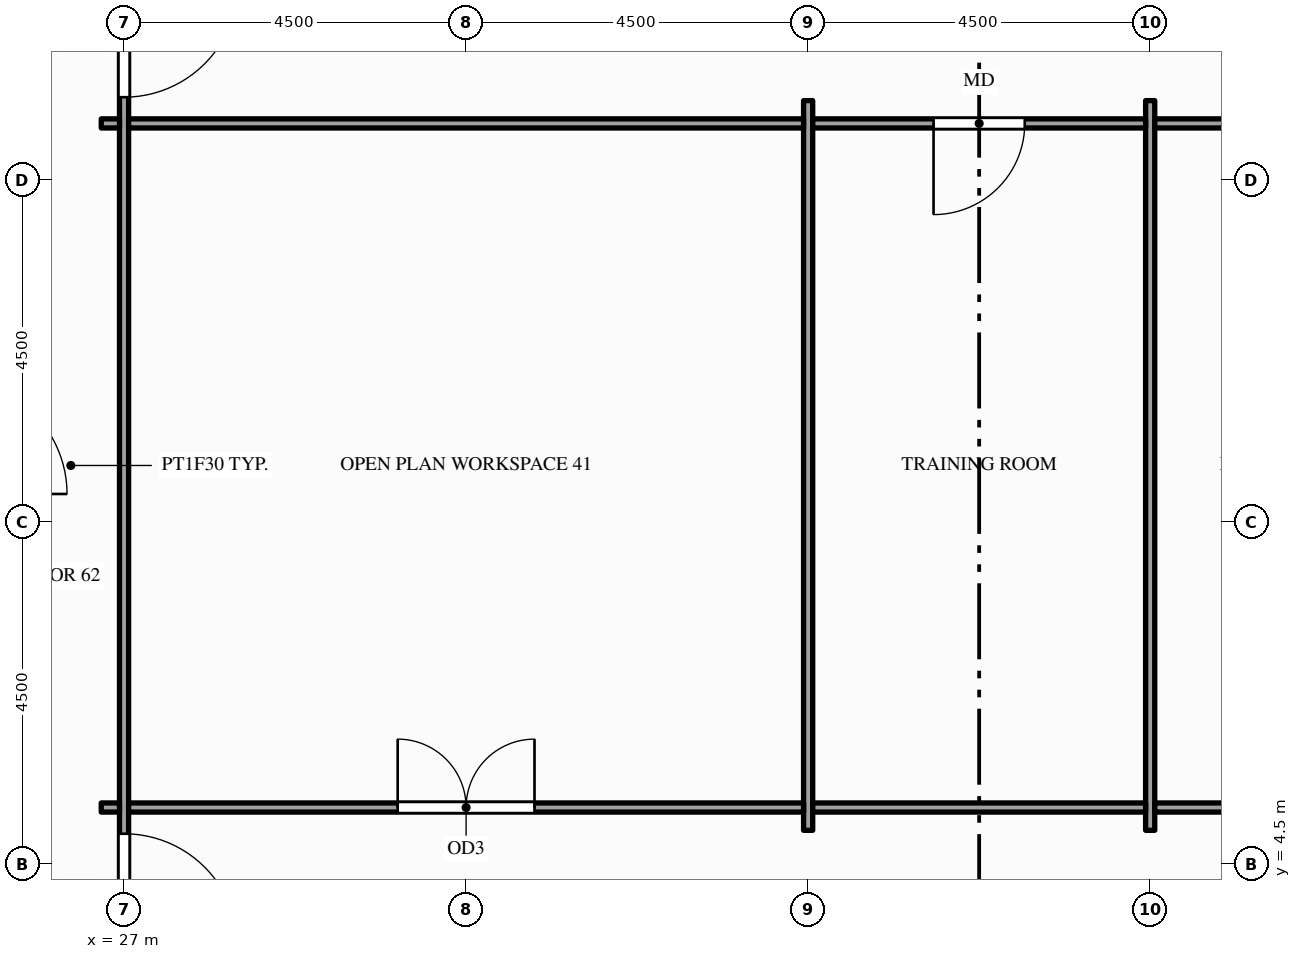
"""IFC4 building model, lengths in metres.
Left out: names, types, materials, properties, quantities, classifications, styles, units other than length and angle.
Written with IfcOpenShell. Run it as: python <this file> out.ifc"""

import sys

from ifc_helpers import new_model, si_unit, direction, frame, frame_2d, origin, place, context, subcontext, project, spatial, rectangle, extrude, element, fill, save


model = new_model("IFC4")
c1 = context("Model", 3, precision=1e-05, world=origin(), true_north=direction((0.0, 1.0)))
c2 = subcontext(c1, "Body", "Model", "MODEL_VIEW")
j1 = project(units=[si_unit("LENGTHUNIT", "METRE"), si_unit("PLANEANGLEUNIT", "RADIAN")], contexts=[c1])
p1 = place(None, origin())
s1 = spatial("IfcSite", under=j1, at=p1, CompositionType="ELEMENT")
p2 = place(p1, origin())
s2 = spatial("IfcBuilding", under=s1, at=p2, CompositionType="ELEMENT")
p3 = place(p2, frame((0.0, 0.0, 195.0)))
s3 = spatial("IfcBuildingStorey", under=s2, at=p3, CompositionType="ELEMENT", Elevation=195.0)
p4 = place(p3, frame((27.0, 2.7, 0.0), z_axis=(0.0, 0.0, 1.0), x_axis=(0.0, 1.0, 0.0)))
e1 = element("IfcWall", 1, at=p4, inside=s3, PredefinedType="PARTITIONING", context=c2, shape_type="SweptSolid", body=[
    extrude(rectangle(XDim=14.1, YDim=0.12, at=frame_2d((7.05, 0.0))), origin(), (0.0, 0.0, 1.0), 2.87),
])
p5 = place(p4, frame((0.705, 0.0, 0.0)))
e2 = element("IfcOpeningElement", 2, at=p5, cuts=e1, PredefinedType="OPENING", context=c2, shape_type="SweptSolid", body=[
    extrude(rectangle(XDim=1.5, YDim=2.1, at=frame_2d((0.75, 1.05))), frame((0.0, 0.07, 0.0), z_axis=(0.0, -1.0, 0.0), x_axis=(1.0, 0.0, 0.0)), (0.0, 0.0, 1.0), 0.14),
])
p6 = place(p4, frame((11.895, 0.0, 0.0)))
e3 = element("IfcOpeningElement", 3, at=p6, cuts=e1, PredefinedType="OPENING", context=c2, shape_type="SweptSolid", body=[
    extrude(rectangle(XDim=1.5, YDim=2.1, at=frame_2d((0.75, 1.05))), frame((0.0, 0.07, 0.0), z_axis=(0.0, -1.0, 0.0), x_axis=(1.0, 0.0, 0.0)), (0.0, 0.0, 1.0), 0.14),
])
for number, where, z_axis, x_axis in (
    (4, (36.0, 4.95, 0.0), (0.0, 0.0, 1.0), (0.0, 1.0, 0.0)),
    (5, (40.5, 4.95, 0.0), (0.0, 0.0, 1.0), (0.0, 1.0, 0.0)),
):
    element("IfcWall", number, at=place(p3, frame(where, z_axis=z_axis, x_axis=x_axis)), inside=s3, PredefinedType="PARTITIONING", context=c2, shape_type="SweptSolid", body=[
        extrude(rectangle(XDim=9.6, YDim=0.12, at=frame_2d((4.8, 0.0))), origin(), (0.0, 0.0, 1.0), 2.87),
    ])
p7 = place(p3, frame((26.7, 5.25, 0.0), z_axis=(0.0, 0.0, 1.0), x_axis=(1.0, 0.0, 0.0)))
e6 = element("IfcWall", 6, at=p7, inside=s3, PredefinedType="PARTITIONING", context=c2, shape_type="SweptSolid", body=[
    extrude(rectangle(XDim=0.24, YDim=0.12, at=frame_2d((0.12, 0.0))), origin(), (0.0, 0.0, 1.0), 2.87),
])
p8 = place(p3, frame((27.06, 5.25, 0.0), z_axis=(0.0, 0.0, 1.0), x_axis=(1.0, 0.0, 0.0)))
e7 = element("IfcWall", 7, at=p8, inside=s3, PredefinedType="PARTITIONING", context=c2, shape_type="SweptSolid", body=[
    extrude(rectangle(XDim=8.88, YDim=0.12, at=frame_2d((4.44, 0.0))), origin(), (0.0, 0.0, 1.0), 2.87),
])
p9 = place(p8, frame((3.54, 0.0, 0.0)))
e8 = element("IfcOpeningElement", 8, at=p9, cuts=e7, PredefinedType="OPENING", context=c2, shape_type="SweptSolid", body=[
    extrude(rectangle(XDim=1.8, YDim=2.1, at=frame_2d((0.9, 1.05))), frame((0.0, 0.07, 0.0), z_axis=(0.0, -1.0, 0.0), x_axis=(1.0, 0.0, 0.0)), (0.0, 0.0, 1.0), 0.14),
])
p10 = place(p3, frame((36.06, 5.25, 0.0), z_axis=(0.0, 0.0, 1.0), x_axis=(1.0, 0.0, 0.0)))
e9 = element("IfcWall", 9, at=p10, inside=s3, PredefinedType="PARTITIONING", context=c2, shape_type="SweptSolid", body=[
    extrude(rectangle(XDim=4.38, YDim=0.12, at=frame_2d((2.19, 0.0))), origin(), (0.0, 0.0, 1.0), 2.87),
])
p11 = place(p3, frame((40.56, 5.25, 0.0), z_axis=(0.0, 0.0, 1.0), x_axis=(1.0, 0.0, 0.0)))
e10 = element("IfcWall", 10, at=p11, inside=s3, PredefinedType="PARTITIONING", context=c2, shape_type="SweptSolid", body=[
    extrude(rectangle(XDim=4.38, YDim=0.12, at=frame_2d((2.19, 0.0))), origin(), (0.0, 0.0, 1.0), 2.87),
])
p12 = place(p11, frame((1.74, 0.0, 0.0)))
e11 = element("IfcOpeningElement", 11, at=p12, cuts=e10, PredefinedType="OPENING", context=c2, shape_type="SweptSolid", body=[
    extrude(rectangle(XDim=0.9, YDim=2.1, at=frame_2d((0.45, 1.05))), frame((0.0, 0.07, 0.0), z_axis=(0.0, -1.0, 0.0), x_axis=(1.0, 0.0, 0.0)), (0.0, 0.0, 1.0), 0.14),
])
p13 = place(p3, frame((26.7, 14.25, 0.0), z_axis=(0.0, 0.0, 1.0), x_axis=(1.0, 0.0, 0.0)))
e12 = element("IfcWall", 12, at=p13, inside=s3, PredefinedType="PARTITIONING", context=c2, shape_type="SweptSolid", body=[
    extrude(rectangle(XDim=0.24, YDim=0.12, at=frame_2d((0.12, 0.0))), origin(), (0.0, 0.0, 1.0), 2.87),
])
p14 = place(p3, frame((27.06, 14.25, 0.0), z_axis=(0.0, 0.0, 1.0), x_axis=(1.0, 0.0, 0.0)))
e13 = element("IfcWall", 13, at=p14, inside=s3, PredefinedType="PARTITIONING", context=c2, shape_type="SweptSolid", body=[
    extrude(rectangle(XDim=8.88, YDim=0.12, at=frame_2d((4.44, 0.0))), origin(), (0.0, 0.0, 1.0), 2.87),
])
p15 = place(p3, frame((36.06, 14.25, 0.0), z_axis=(0.0, 0.0, 1.0), x_axis=(1.0, 0.0, 0.0)))
e14 = element("IfcWall", 14, at=p15, inside=s3, PredefinedType="PARTITIONING", context=c2, shape_type="SweptSolid", body=[
    extrude(rectangle(XDim=4.38, YDim=0.12, at=frame_2d((2.19, 0.0))), origin(), (0.0, 0.0, 1.0), 2.87),
])
p16 = place(p15, frame((1.59, 0.0, 0.0)))
e15 = element("IfcOpeningElement", 15, at=p16, cuts=e14, PredefinedType="OPENING", context=c2, shape_type="SweptSolid", body=[
    extrude(rectangle(XDim=1.2, YDim=2.1, at=frame_2d((0.6, 1.05))), frame((0.0, 0.07, 0.0), z_axis=(0.0, -1.0, 0.0), x_axis=(1.0, 0.0, 0.0)), (0.0, 0.0, 1.0), 0.14),
])
p17 = place(p3, frame((40.56, 14.25, 0.0), z_axis=(0.0, 0.0, 1.0), x_axis=(1.0, 0.0, 0.0)))
e16 = element("IfcWall", 16, at=p17, inside=s3, PredefinedType="PARTITIONING", context=c2, shape_type="SweptSolid", body=[
    extrude(rectangle(XDim=4.38, YDim=0.12, at=frame_2d((2.19, 0.0))), origin(), (0.0, 0.0, 1.0), 2.87),
])
p18 = place(p5, origin())
e17 = element("IfcDoor", 17, at=p18, inside=s3, OperationType="SINGLE_SWING_LEFT", PredefinedType="DOOR", context=c2, shape_type="SweptSolid", body=[
    extrude(rectangle(XDim=1.5, YDim=2.1, at=frame_2d((0.75, 1.05))), frame((0.0, 0.025, 0.0), z_axis=(0.0, -1.0, 0.0), x_axis=(1.0, 0.0, 0.0)), (0.0, 0.0, 1.0), 0.05),
])
fill(e2, e17)
p19 = place(p6, origin())
e18 = element("IfcDoor", 18, at=p19, inside=s3, OperationType="SINGLE_SWING_RIGHT", PredefinedType="DOOR", context=c2, shape_type="SweptSolid", body=[
    extrude(rectangle(XDim=1.5, YDim=2.1, at=frame_2d((0.75, 1.05))), frame((0.0, 0.025, 0.0), z_axis=(0.0, -1.0, 0.0), x_axis=(1.0, 0.0, 0.0)), (0.0, 0.0, 1.0), 0.05),
])
fill(e3, e18)
p20 = place(p9, origin())
e19 = element("IfcDoor", 19, at=p20, inside=s3, OperationType="DOUBLE_DOOR_SINGLE_SWING", PredefinedType="DOOR", context=c2, shape_type="SweptSolid", body=[
    extrude(rectangle(XDim=1.8, YDim=2.1, at=frame_2d((0.9, 1.05))), frame((0.0, 0.025, 0.0), z_axis=(0.0, -1.0, 0.0), x_axis=(1.0, 0.0, 0.0)), (0.0, 0.0, 1.0), 0.05),
])
fill(e8, e19)
p21 = place(p16, origin())
e20 = element("IfcDoor", 20, at=p21, inside=s3, OperationType="SINGLE_SWING_LEFT", PredefinedType="DOOR", context=c2, shape_type="SweptSolid", body=[
    extrude(rectangle(XDim=1.2, YDim=2.1, at=frame_2d((0.6, 1.05))), frame((0.0, 0.025, 0.0), z_axis=(0.0, -1.0, 0.0), x_axis=(1.0, 0.0, 0.0)), (0.0, 0.0, 1.0), 0.05),
])
fill(e15, e20)
save(model, sys.argv[1])
